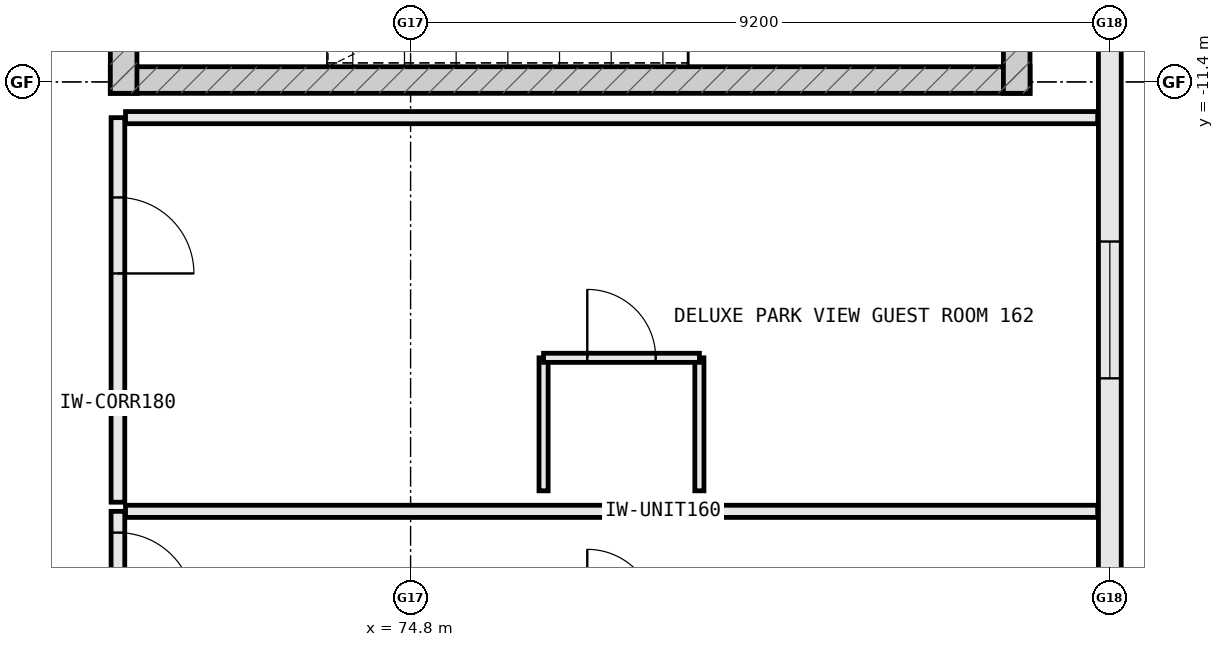
"""IFC4 building model, lengths in metres.
Left out: names, types, materials, properties, quantities, classifications, styles, units other than length and angle.
Written with IfcOpenShell. Run it as: python <this file> out.ifc"""

import sys

from ifc_helpers import new_model, si_unit, direction, frame, frame_2d, origin, place, context, subcontext, project, spatial, rectangle, extrude, element, fill, save


model = new_model("IFC4")
c1 = context("Model", 3, precision=1e-05, world=origin(), true_north=direction((0.0, 1.0)))
c2 = subcontext(c1, "Body", "Model", "MODEL_VIEW")
j1 = project(units=[si_unit("LENGTHUNIT", "METRE"), si_unit("PLANEANGLEUNIT", "RADIAN")], contexts=[c1])
p1 = place(None, origin())
s1 = spatial("IfcSite", under=j1, at=p1, CompositionType="ELEMENT")
p2 = place(p1, origin())
s2 = spatial("IfcBuilding", under=s1, at=p2, CompositionType="ELEMENT")
p3 = place(p2, frame((0.0, 0.0, 23.8)))
s3 = spatial("IfcBuildingStorey", under=s2, at=p3, CompositionType="ELEMENT", Elevation=23.8)
p4 = place(p3, frame((84.0, -18.342, 0.0), z_axis=(0.0, 0.0, 1.0), x_axis=(0.0, 1.0, 0.0)))
e1 = element("IfcWall", 1, at=p4, inside=s3, PredefinedType="STANDARD", context=c2, shape_type="SweptSolid", body=[
    extrude(rectangle(XDim=9.084, YDim=0.3, at=frame_2d((4.542, 0.0))), origin(), (0.0, 0.0, 1.0), 2.965),
])
p5 = place(p4, frame((3.042, 0.0, 0.85)))
e2 = element("IfcOpeningElement", 2, at=p5, cuts=e1, PredefinedType="OPENING", context=c2, shape_type="SweptSolid", body=[
    extrude(rectangle(XDim=1.8, YDim=1.85, at=frame_2d((0.9, 0.925))), frame((0.0, 0.162, 0.0), z_axis=(0.0, -1.0, 0.0), x_axis=(1.0, 0.0, 0.0)), (0.0, 0.0, 1.0), 0.324),
])
p6 = place(p3, frame((70.85, -11.375, 0.0), z_axis=(0.0, 0.0, 1.0), x_axis=(1.0, 0.0, 0.0)))
e3 = element("IfcWall", 3, at=p6, inside=s3, PredefinedType="SHEAR", context=c2, shape_type="SweptSolid", body=[
    extrude(rectangle(XDim=12.1, YDim=0.35, at=frame_2d((6.05, 0.0))), origin(), (0.0, 0.0, 1.0), 3.8),
])
p7 = place(p3, frame((82.775, -11.55, 0.0), z_axis=(0.0, 0.0, 1.0), x_axis=(0.0, 1.0, 0.0)))
e4 = element("IfcWall", 4, at=p7, inside=s3, PredefinedType="SHEAR", context=c2, shape_type="SweptSolid", body=[
    extrude(rectangle(XDim=5.1, YDim=0.35, at=frame_2d((2.55, 0.0))), origin(), (0.0, 0.0, 1.0), 3.8),
])
p8 = place(p3, frame((71.025, -6.45, 0.0), z_axis=(0.0, 0.0, 1.0), x_axis=(0.0, -1.0, 0.0)))
e5 = element("IfcWall", 5, at=p8, inside=s3, PredefinedType="SHEAR", context=c2, shape_type="SweptSolid", body=[
    extrude(rectangle(XDim=5.1, YDim=0.35, at=frame_2d((2.55, 0.0))), origin(), (0.0, 0.0, 1.0), 3.8),
])
p9 = place(p8, frame((2.0, 0.0, 0.0)))
e6 = element("IfcOpeningElement", 6, at=p9, cuts=e5, PredefinedType="OPENING", context=c2, shape_type="SweptSolid", body=[
    extrude(rectangle(XDim=1.1, YDim=2.2, at=frame_2d((0.55, 1.1))), frame((0.0, 0.187, 0.0), z_axis=(0.0, -1.0, 0.0), x_axis=(1.0, 0.0, 0.0)), (0.0, 0.0, 1.0), 0.374),
])
p10 = place(p3, frame((70.95, -17.05, 0.0), z_axis=(0.0, 0.0, 1.0), x_axis=(0.0, -1.0, 0.0)))
e7 = element("IfcWall", 7, at=p10, inside=s3, PredefinedType="PARTITIONING", context=c2, shape_type="SweptSolid", body=[
    extrude(rectangle(XDim=3.3, YDim=0.18, at=frame_2d((1.65, 0.0))), origin(), (0.0, 0.0, 1.0), 3.55),
])
p11 = place(p10, frame((0.28, 0.0, 0.0)))
e8 = element("IfcOpeningElement", 8, at=p11, cuts=e7, PredefinedType="OPENING", context=c2, shape_type="SweptSolid", body=[
    extrude(rectangle(XDim=1.0, YDim=2.2, at=frame_2d((0.5, 1.1))), frame((0.0, 0.102, 0.0), z_axis=(0.0, -1.0, 0.0), x_axis=(1.0, 0.0, 0.0)), (0.0, 0.0, 1.0), 0.204),
])
p12 = place(p3, frame((71.05, -17.05, 0.0), z_axis=(0.0, 0.0, 1.0), x_axis=(1.0, 0.0, 0.0)))
e9 = element("IfcWall", 9, at=p12, inside=s3, PredefinedType="PARTITIONING", context=c2, shape_type="SweptSolid", body=[
    extrude(rectangle(XDim=12.79, YDim=0.16, at=frame_2d((6.395, 0.0))), origin(), (0.0, 0.0, 1.0), 3.55),
])
p13 = place(p3, frame((70.95, -11.87, 0.0), z_axis=(0.0, 0.0, 1.0), x_axis=(0.0, -1.0, 0.0)))
e10 = element("IfcWall", 10, at=p13, inside=s3, PredefinedType="PARTITIONING", context=c2, shape_type="SweptSolid", body=[
    extrude(rectangle(XDim=5.06, YDim=0.18, at=frame_2d((2.53, 0.0))), origin(), (0.0, 0.0, 1.0), 3.55),
])
p14 = place(p13, frame((1.05, 0.0, 0.0)))
e11 = element("IfcOpeningElement", 11, at=p14, cuts=e10, PredefinedType="OPENING", context=c2, shape_type="SweptSolid", body=[
    extrude(rectangle(XDim=1.0, YDim=2.2, at=frame_2d((0.5, 1.1))), frame((0.0, 0.102, 0.0), z_axis=(0.0, -1.0, 0.0), x_axis=(1.0, 0.0, 0.0)), (0.0, 0.0, 1.0), 0.204),
])
p15 = place(p3, frame((71.05, -11.87, 0.0), z_axis=(0.0, 0.0, 1.0), x_axis=(1.0, 0.0, 0.0)))
e12 = element("IfcWall", 12, at=p15, inside=s3, PredefinedType="PARTITIONING", context=c2, shape_type="SweptSolid", body=[
    extrude(rectangle(XDim=12.79, YDim=0.16, at=frame_2d((6.395, 0.0))), origin(), (0.0, 0.0, 1.0), 3.55),
])
for number, where, z_axis, x_axis in (
    (13, (76.55, -16.78, 0.0), (0.0, 0.0, 1.0), (0.0, 1.0, 0.0)),
    (14, (78.6, -16.78, 0.0), (0.0, 0.0, 1.0), (0.0, 1.0, 0.0)),
):
    element("IfcWall", number, at=place(p3, frame(where, z_axis=z_axis, x_axis=x_axis)), inside=s3, PredefinedType="PARTITIONING", context=c2, shape_type="SweptSolid", body=[
        extrude(rectangle(XDim=1.75, YDim=0.12, at=frame_2d((0.875, 0.0))), origin(), (0.0, 0.0, 1.0), 3.55),
    ])
p16 = place(p3, frame((76.55, -15.03, 0.0), z_axis=(0.0, 0.0, 1.0), x_axis=(1.0, 0.0, 0.0)))
e15 = element("IfcWall", 15, at=p16, inside=s3, PredefinedType="PARTITIONING", context=c2, shape_type="SweptSolid", body=[
    extrude(rectangle(XDim=2.05, YDim=0.12, at=frame_2d((1.025, 0.0))), origin(), (0.0, 0.0, 1.0), 3.55),
])
p17 = place(p16, frame((0.575, 0.0, 0.0)))
e16 = element("IfcOpeningElement", 16, at=p17, cuts=e15, PredefinedType="OPENING", context=c2, shape_type="SweptSolid", body=[
    extrude(rectangle(XDim=0.9, YDim=2.15, at=frame_2d((0.45, 1.075))), frame((0.0, 0.072, 0.0), z_axis=(0.0, -1.0, 0.0), x_axis=(1.0, 0.0, 0.0)), (0.0, 0.0, 1.0), 0.144),
])
p18 = place(p5, origin())
e17 = element("IfcWindow", 17, at=p18, inside=s3, PartitioningType="SINGLE_PANEL", PredefinedType="WINDOW", context=c2, shape_type="SweptSolid", body=[
    extrude(rectangle(XDim=1.8, YDim=1.85, at=frame_2d((0.9, 0.925))), frame((0.0, 0.03, 0.0), z_axis=(0.0, -1.0, 0.0), x_axis=(1.0, 0.0, 0.0)), (0.0, 0.0, 1.0), 0.06),
])
fill(e2, e17)
p19 = place(p11, origin())
e18 = element("IfcDoor", 18, at=p19, inside=s3, OperationType="SINGLE_SWING_RIGHT", PredefinedType="DOOR", context=c2, shape_type="SweptSolid", body=[
    extrude(rectangle(XDim=1.0, YDim=2.2, at=frame_2d((0.5, 1.1))), frame((0.0, 0.025, 0.0), z_axis=(0.0, -1.0, 0.0), x_axis=(1.0, 0.0, 0.0)), (0.0, 0.0, 1.0), 0.05),
])
fill(e8, e18)
p20 = place(p14, origin())
e19 = element("IfcDoor", 19, at=p20, inside=s3, OperationType="SINGLE_SWING_RIGHT", PredefinedType="DOOR", context=c2, shape_type="SweptSolid", body=[
    extrude(rectangle(XDim=1.0, YDim=2.2, at=frame_2d((0.5, 1.1))), frame((0.0, 0.025, 0.0), z_axis=(0.0, -1.0, 0.0), x_axis=(1.0, 0.0, 0.0)), (0.0, 0.0, 1.0), 0.05),
])
fill(e11, e19)
p21 = place(p17, origin())
e20 = element("IfcDoor", 20, at=p21, inside=s3, OperationType="SINGLE_SWING_LEFT", PredefinedType="DOOR", context=c2, shape_type="SweptSolid", body=[
    extrude(rectangle(XDim=0.9, YDim=2.15, at=frame_2d((0.45, 1.075))), frame((0.0, 0.025, 0.0), z_axis=(0.0, -1.0, 0.0), x_axis=(1.0, 0.0, 0.0)), (0.0, 0.0, 1.0), 0.05),
])
fill(e16, e20)
save(model, sys.argv[1])
